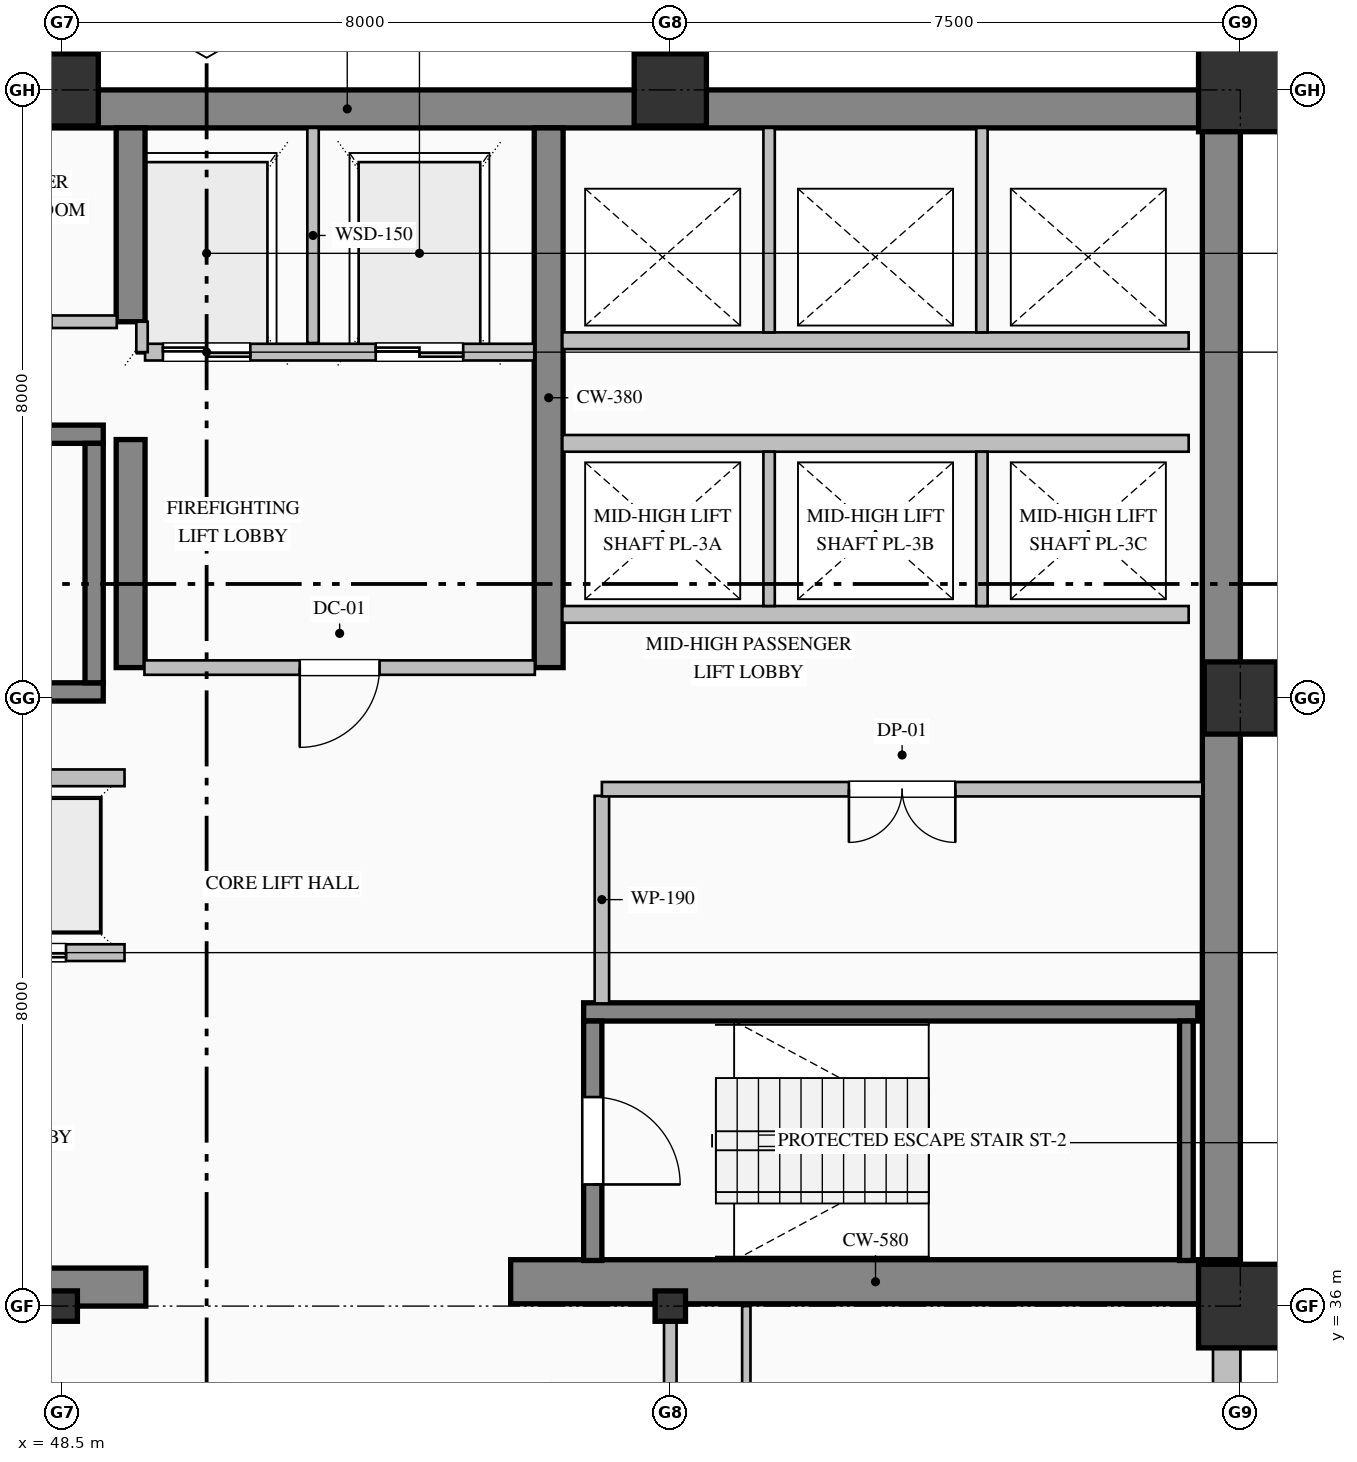
"""IFC4 building model, lengths in metres.
Left out: names, types, materials, properties, quantities, classifications, styles, units other than length and angle.
Written with IfcOpenShell. Run it as: python <this file> out.ifc"""

import sys

from ifc_helpers import new_model, si_unit, direction, frame, frame_2d, origin, origin_2d, place, context, subcontext, project, spatial, rectangle, hollow_rectangle, i_section, extrude, element, fill, save


model = new_model("IFC4")
c1 = context("Model", 3, precision=1e-05, world=origin(), true_north=direction((0.0, 1.0)))
c2 = subcontext(c1, "Body", "Model", "MODEL_VIEW")
j1 = project(units=[si_unit("LENGTHUNIT", "METRE"), si_unit("PLANEANGLEUNIT", "RADIAN")], contexts=[c1])
p1 = place(None, origin())
s1 = spatial("IfcSite", under=j1, at=p1, CompositionType="ELEMENT")
p2 = place(p1, origin())
s2 = spatial("IfcBuilding", under=s1, at=p2, CompositionType="ELEMENT")
p3 = place(p2, frame((0.0, 0.0, 155.0)))
s3 = spatial("IfcBuildingStorey", under=s2, at=p3, CompositionType="ELEMENT", Elevation=155.0)
p4 = place(p3, frame((40.5, 51.75, 0.0), z_axis=(0.0, 0.0, 1.0), x_axis=(1.0, 0.0, 0.0)))
e1 = element("IfcWall", 1, at=p4, inside=s3, PredefinedType="SHEAR", context=c2, shape_type="SweptSolid", body=[
    extrude(rectangle(XDim=23.5, YDim=0.5, at=frame_2d((11.75, 0.0))), origin(), (0.0, 0.0, 1.0), 3.765),
])
p5 = place(p3, frame((63.75, 36.32, 0.0), z_axis=(0.0, 0.0, 1.0), x_axis=(0.0, 1.0, 0.0)))
e2 = element("IfcWall", 2, at=p5, inside=s3, PredefinedType="SHEAR", context=c2, shape_type="SweptSolid", body=[
    extrude(rectangle(XDim=15.18, YDim=0.5, at=frame_2d((7.59, 0.0))), origin(), (0.0, 0.0, 1.0), 3.765),
])
p6 = place(p3, frame((40.5, 36.25, 0.0), z_axis=(0.0, 0.0, 1.0), x_axis=(1.0, 0.0, 0.0)))
e3 = element("IfcWall", 3, at=p6, inside=s3, PredefinedType="SHEAR", context=c2, shape_type="SweptSolid", body=[
    extrude(rectangle(XDim=9.1, YDim=0.5, at=frame_2d((4.55, 0.0))), origin(), (0.0, 0.0, 1.0), 3.765),
])
p7 = place(p3, frame((54.4, 36.32, 0.0), z_axis=(0.0, 0.0, 1.0), x_axis=(1.0, 0.0, 0.0)))
e4 = element("IfcWall", 4, at=p7, inside=s3, PredefinedType="SHEAR", context=c2, shape_type="SweptSolid", body=[
    extrude(rectangle(XDim=9.6, YDim=0.58, at=frame_2d((4.8, 0.0))), origin(), (0.0, 0.0, 1.0), 4.0),
])
p8 = place(p3, frame((49.4, 44.4, 0.0), z_axis=(0.0, 0.0, 1.0), x_axis=(0.0, 1.0, 0.0)))
e5 = element("IfcWall", 5, at=p8, inside=s3, PredefinedType="SHEAR", context=c2, shape_type="SweptSolid", body=[
    extrude(rectangle(XDim=3.0, YDim=0.38, at=frame_2d((1.5, 0.0))), origin(), (0.0, 0.0, 1.0), 3.765),
])
p9 = place(p3, frame((49.4, 48.95, 0.0), z_axis=(0.0, 0.0, 1.0), x_axis=(0.0, 1.0, 0.0)))
e6 = element("IfcWall", 6, at=p9, inside=s3, PredefinedType="SHEAR", context=c2, shape_type="SweptSolid", body=[
    extrude(rectangle(XDim=2.55, YDim=0.38, at=frame_2d((1.275, 0.0))), origin(), (0.0, 0.0, 1.0), 3.765),
])
p10 = place(p3, frame((54.9, 44.4, 0.0), z_axis=(0.0, 0.0, 1.0), x_axis=(0.0, 1.0, 0.0)))
e7 = element("IfcWall", 7, at=p10, inside=s3, PredefinedType="SHEAR", context=c2, shape_type="SweptSolid", body=[
    extrude(rectangle(XDim=7.1, YDim=0.38, at=frame_2d((3.55, 0.0))), origin(), (0.0, 0.0, 1.0), 3.765),
])
p11 = place(p3, frame((48.5, 36.0, 0.0), z_axis=(0.0, 0.0, 1.0), x_axis=(1.0, 0.0, 0.0)))
e8 = element("IfcColumn", 8, at=p11, inside=s3, PredefinedType="COLUMN", context=c2, shape_type="SweptSolid", body=[
    extrude(i_section(OverallWidth=0.4, OverallDepth=0.4, WebThickness=0.013, FlangeThickness=0.021, FilletRadius=0.022, at=origin_2d()), origin(), (0.0, 0.0, 1.0), 4.0),
])
p12 = place(p3, frame((48.5, 52.0, 0.0), z_axis=(0.0, 0.0, 1.0), x_axis=(1.0, 0.0, 0.0)))
e9 = element("IfcColumn", 9, at=p12, inside=s3, PredefinedType="COLUMN", context=c2, shape_type="SweptSolid", body=[
    extrude(hollow_rectangle(XDim=0.95, YDim=0.95, WallThickness=0.036, at=origin_2d()), origin(), (0.0, 0.0, 1.0), 4.0),
])
p13 = place(p3, frame((56.5, 36.0, 0.0), z_axis=(0.0, 0.0, 1.0), x_axis=(1.0, 0.0, 0.0)))
e10 = element("IfcColumn", 10, at=p13, inside=s3, PredefinedType="COLUMN", context=c2, shape_type="SweptSolid", body=[
    extrude(i_section(OverallWidth=0.4, OverallDepth=0.4, WebThickness=0.013, FlangeThickness=0.021, FilletRadius=0.022, at=origin_2d()), origin(), (0.0, 0.0, 1.0), 4.0),
])
p14 = place(p3, frame((56.5, 52.0, 0.0), z_axis=(0.0, 0.0, 1.0), x_axis=(1.0, 0.0, 0.0)))
e11 = element("IfcColumn", 11, at=p14, inside=s3, PredefinedType="COLUMN", context=c2, shape_type="SweptSolid", body=[
    extrude(hollow_rectangle(XDim=0.95, YDim=0.95, WallThickness=0.036, at=origin_2d()), origin(), (0.0, 0.0, 1.0), 4.0),
])
p15 = place(p3, frame((64.0, 36.0, 0.0), z_axis=(0.0, 0.0, 1.0), x_axis=(1.0, 0.0, 0.0)))
e12 = element("IfcColumn", 12, at=p15, inside=s3, PredefinedType="COLUMN", context=c2, shape_type="SweptSolid", body=[
    extrude(hollow_rectangle(XDim=1.1, YDim=1.1, WallThickness=0.04, at=origin_2d()), origin(), (0.0, 0.0, 1.0), 4.0),
])
p16 = place(p3, frame((64.0, 44.0, 0.0), z_axis=(0.0, 0.0, 1.0), x_axis=(1.0, 0.0, 0.0)))
e13 = element("IfcColumn", 13, at=p16, inside=s3, PredefinedType="COLUMN", context=c2, shape_type="SweptSolid", body=[
    extrude(hollow_rectangle(XDim=0.95, YDim=0.95, WallThickness=0.036, at=origin_2d()), origin(), (0.0, 0.0, 1.0), 4.0),
])
p17 = place(p3, frame((64.0, 52.0, 0.0), z_axis=(0.0, 0.0, 1.0), x_axis=(1.0, 0.0, 0.0)))
e14 = element("IfcColumn", 14, at=p17, inside=s3, PredefinedType="COLUMN", context=c2, shape_type="SweptSolid", body=[
    extrude(hollow_rectangle(XDim=1.1, YDim=1.1, WallThickness=0.04, at=origin_2d()), origin(), (0.0, 0.0, 1.0), 4.0),
])
p18 = place(p3, frame((63.82, 36.05, 0.0), z_axis=(0.0, 0.0, 1.0), x_axis=(0.0, -1.0, 0.0)))
e15 = element("IfcWall", 15, at=p18, inside=s3, PredefinedType="SOLIDWALL", context=c2, shape_type="SweptSolid", body=[
    extrude(rectangle(XDim=28.05, YDim=0.36, at=frame_2d((14.025, 0.0))), origin(), (0.0, 0.0, 1.0), 3.265),
])
p19 = place(p18, frame((2.775, 0.0, 0.85)))
e16 = element("IfcOpeningElement", 16, at=p19, cuts=e15, PredefinedType="OPENING", context=c2, shape_type="SweptSolid", body=[
    extrude(rectangle(XDim=1.65, YDim=1.95, at=frame_2d((0.825, 0.975))), frame((0.0, 0.19, 0.0), z_axis=(0.0, -1.0, 0.0), x_axis=(1.0, 0.0, 0.0)), (0.0, 0.0, 1.0), 0.38),
])
p20 = place(p18, frame((10.05, 0.0, 0.85)))
e17 = element("IfcOpeningElement", 17, at=p20, cuts=e15, PredefinedType="OPENING", context=c2, shape_type="SweptSolid", body=[
    extrude(rectangle(XDim=1.5, YDim=1.95, at=frame_2d((0.75, 0.975))), frame((0.0, 0.19, 0.0), z_axis=(0.0, -1.0, 0.0), x_axis=(1.0, 0.0, 0.0)), (0.0, 0.0, 1.0), 0.38),
])
p21 = place(p18, frame((13.575, 0.0, 0.85)))
e18 = element("IfcOpeningElement", 18, at=p21, cuts=e15, PredefinedType="OPENING", context=c2, shape_type="SweptSolid", body=[
    extrude(rectangle(XDim=1.65, YDim=1.95, at=frame_2d((0.825, 0.975))), frame((0.0, 0.19, 0.0), z_axis=(0.0, -1.0, 0.0), x_axis=(1.0, 0.0, 0.0)), (0.0, 0.0, 1.0), 0.38),
])
for number, where, z_axis, x_axis in (
    (19, (40.96, 47.47, 0.0), (0.0, 0.0, 1.0), (1.0, 0.0, 0.0)),
    (20, (49.04, 44.08, 0.0), (0.0, 0.0, 1.0), (-1.0, 0.0, 0.0)),
):
    element("IfcWall", number, at=place(p3, frame(where, z_axis=z_axis, x_axis=x_axis)), inside=s3, PredefinedType="SOLIDWALL", context=c2, shape_type="SweptSolid", body=[
        extrude(rectangle(XDim=8.08, YDim=0.24, at=frame_2d((4.04, 0.0))), origin(), (0.0, 0.0, 1.0), 4.0),
    ])
p22 = place(p3, frame((48.92, 44.2, 0.0), z_axis=(0.0, 0.0, 1.0), x_axis=(0.0, 1.0, 0.0)))
e21 = element("IfcWall", 21, at=p22, inside=s3, PredefinedType="SOLIDWALL", context=c2, shape_type="SweptSolid", body=[
    extrude(rectangle(XDim=3.15, YDim=0.24, at=frame_2d((1.575, 0.0))), origin(), (0.0, 0.0, 1.0), 4.0),
])
p23 = place(p3, frame((55.36, 39.87, 0.0), z_axis=(0.0, 0.0, 1.0), x_axis=(1.0, 0.0, 0.0)))
e22 = element("IfcWall", 22, at=p23, inside=s3, PredefinedType="SOLIDWALL", context=c2, shape_type="SweptSolid", body=[
    extrude(rectangle(XDim=8.08, YDim=0.24, at=frame_2d((4.04, 0.0))), origin(), (0.0, 0.0, 1.0), 4.0),
])
p24 = place(p3, frame((55.48, 39.75, 0.0), z_axis=(0.0, 0.0, 1.0), x_axis=(0.0, -1.0, 0.0)))
e23 = element("IfcWall", 23, at=p24, inside=s3, PredefinedType="SOLIDWALL", context=c2, shape_type="SweptSolid", body=[
    extrude(rectangle(XDim=3.15, YDim=0.24, at=frame_2d((1.575, 0.0))), origin(), (0.0, 0.0, 1.0), 4.0),
])
p25 = place(p24, frame((1.0, 0.0, 0.0)))
e24 = element("IfcOpeningElement", 24, at=p25, cuts=e23, PredefinedType="OPENING", context=c2, shape_type="SweptSolid", body=[
    extrude(rectangle(XDim=1.15, YDim=2.2, at=frame_2d((0.575, 1.1))), frame((0.0, 0.13, 0.0), z_axis=(0.0, -1.0, 0.0), x_axis=(1.0, 0.0, 0.0)), (0.0, 0.0, 1.0), 0.26),
])
p26 = place(p3, frame((63.29, 36.6, 0.0), z_axis=(0.0, 0.0, 1.0), x_axis=(0.0, 1.0, 0.0)))
e25 = element("IfcWall", 25, at=p26, inside=s3, PredefinedType="SOLIDWALL", context=c2, shape_type="SweptSolid", body=[
    extrude(rectangle(XDim=3.15, YDim=0.18, at=frame_2d((1.575, 0.0))), origin(), (0.0, 0.0, 1.0), 4.0),
])
p27 = place(p3, frame((54.71, 48.55, 0.0), z_axis=(0.0, 0.0, 1.0), x_axis=(-1.0, 0.0, 0.0)))
e26 = element("IfcWall", 26, at=p27, inside=s3, PredefinedType="PARTITIONING", context=c2, shape_type="SweptSolid", body=[
    extrude(rectangle(XDim=5.12, YDim=0.22, at=frame_2d((2.56, 0.0))), origin(), (0.0, 0.0, 1.0), 3.765),
])
p28 = place(p27, frame((3.735, 0.0, 0.0)))
e27 = element("IfcOpeningElement", 27, at=p28, cuts=e26, PredefinedType="OPENING", context=c2, shape_type="SweptSolid", body=[
    extrude(rectangle(XDim=1.15, YDim=2.2, at=frame_2d((0.575, 1.1))), frame((0.0, 0.12, 0.0), z_axis=(0.0, -1.0, 0.0), x_axis=(1.0, 0.0, 0.0)), (0.0, 0.0, 1.0), 0.24),
])
p29 = place(p27, frame((0.935, 0.0, 0.0)))
e28 = element("IfcOpeningElement", 28, at=p29, cuts=e26, PredefinedType="OPENING", context=c2, shape_type="SweptSolid", body=[
    extrude(rectangle(XDim=1.15, YDim=2.2, at=frame_2d((0.575, 1.1))), frame((0.0, 0.12, 0.0), z_axis=(0.0, -1.0, 0.0), x_axis=(1.0, 0.0, 0.0)), (0.0, 0.0, 1.0), 0.24),
])
p30 = place(p3, frame((51.8, 48.67, 0.0), z_axis=(0.0, 0.0, 1.0), x_axis=(0.0, 1.0, 0.0)))
e29 = element("IfcWall", 29, at=p30, inside=s3, PredefinedType="PARTITIONING", context=c2, shape_type="SweptSolid", body=[
    extrude(rectangle(XDim=2.83, YDim=0.15, at=frame_2d((1.415, 0.0))), origin(), (0.0, 0.0, 1.0), 3.765),
])
p31 = place(p3, frame((49.55, 48.55, 0.0), z_axis=(0.0, 0.0, 1.0), x_axis=(0.0, 1.0, 0.0)))
e30 = element("IfcWall", 30, at=p31, inside=s3, PredefinedType="PARTITIONING", context=c2, shape_type="SweptSolid", body=[
    extrude(rectangle(XDim=0.4, YDim=0.15, at=frame_2d((0.2, 0.0))), origin(), (0.0, 0.0, 1.0), 3.765),
])
p32 = place(p3, frame((49.32, 40.65, 0.0), z_axis=(0.0, 0.0, 1.0), x_axis=(-1.0, 0.0, 0.0)))
e31 = element("IfcWall", 31, at=p32, inside=s3, PredefinedType="PARTITIONING", context=c2, shape_type="SweptSolid", body=[
    extrude(rectangle(XDim=8.24, YDim=0.22, at=frame_2d((4.12, 0.0))), origin(), (0.0, 0.0, 1.0), 3.765),
])
p33 = place(p32, frame((6.37, 0.0, 0.0)))
e32 = element("IfcOpeningElement", 32, at=p33, cuts=e31, PredefinedType="OPENING", context=c2, shape_type="SweptSolid", body=[
    extrude(rectangle(XDim=1.1, YDim=2.2, at=frame_2d((0.55, 1.1))), frame((0.0, 0.12, 0.0), z_axis=(0.0, -1.0, 0.0), x_axis=(1.0, 0.0, 0.0)), (0.0, 0.0, 1.0), 0.24),
])
p34 = place(p32, frame((3.57, 0.0, 0.0)))
e33 = element("IfcOpeningElement", 33, at=p34, cuts=e31, PredefinedType="OPENING", context=c2, shape_type="SweptSolid", body=[
    extrude(rectangle(XDim=1.1, YDim=2.2, at=frame_2d((0.55, 1.1))), frame((0.0, 0.12, 0.0), z_axis=(0.0, -1.0, 0.0), x_axis=(1.0, 0.0, 0.0)), (0.0, 0.0, 1.0), 0.24),
])
p35 = place(p32, frame((0.77, 0.0, 0.0)))
e34 = element("IfcOpeningElement", 34, at=p35, cuts=e31, PredefinedType="OPENING", context=c2, shape_type="SweptSolid", body=[
    extrude(rectangle(XDim=1.1, YDim=2.2, at=frame_2d((0.55, 1.1))), frame((0.0, 0.12, 0.0), z_axis=(0.0, -1.0, 0.0), x_axis=(1.0, 0.0, 0.0)), (0.0, 0.0, 1.0), 0.24),
])
for number, where, z_axis, x_axis in (
    (35, (41.08, 42.95, 0.0), (0.0, 0.0, 1.0), (1.0, 0.0, 0.0)),
    (36, (63.32, 45.1, 0.0), (0.0, 0.0, 1.0), (-1.0, 0.0, 0.0)),
    (37, (55.08, 47.35, 0.0), (0.0, 0.0, 1.0), (1.0, 0.0, 0.0)),
):
    element("IfcWall", number, at=place(p3, frame(where, z_axis=z_axis, x_axis=x_axis)), inside=s3, PredefinedType="PARTITIONING", context=c2, shape_type="SweptSolid", body=[
        extrude(rectangle(XDim=8.24, YDim=0.22, at=frame_2d((4.12, 0.0))), origin(), (0.0, 0.0, 1.0), 3.765),
    ])
for number, where, z_axis, x_axis in (
    (38, (57.8, 45.21, 0.0), (0.0, 0.0, 1.0), (0.0, 1.0, 0.0)),
    (39, (60.6, 45.21, 0.0), (0.0, 0.0, 1.0), (0.0, 1.0, 0.0)),
):
    element("IfcWall", number, at=place(p3, frame(where, z_axis=z_axis, x_axis=x_axis)), inside=s3, PredefinedType="PARTITIONING", context=c2, shape_type="SweptSolid", body=[
        extrude(rectangle(XDim=2.03, YDim=0.15, at=frame_2d((1.015, 0.0))), origin(), (0.0, 0.0, 1.0), 3.765),
    ])
p36 = place(p3, frame((63.32, 48.7, 0.0), z_axis=(0.0, 0.0, 1.0), x_axis=(-1.0, 0.0, 0.0)))
e40 = element("IfcWall", 40, at=p36, inside=s3, PredefinedType="PARTITIONING", context=c2, shape_type="SweptSolid", body=[
    extrude(rectangle(XDim=8.24, YDim=0.22, at=frame_2d((4.12, 0.0))), origin(), (0.0, 0.0, 1.0), 3.765),
])
for number, where, z_axis, x_axis in (
    (41, (57.8, 48.81, 0.0), (0.0, 0.0, 1.0), (0.0, 1.0, 0.0)),
    (42, (60.6, 48.81, 0.0), (0.0, 0.0, 1.0), (0.0, 1.0, 0.0)),
):
    element("IfcWall", number, at=place(p3, frame(where, z_axis=z_axis, x_axis=x_axis)), inside=s3, PredefinedType="PARTITIONING", context=c2, shape_type="SweptSolid", body=[
        extrude(rectangle(XDim=2.69, YDim=0.15, at=frame_2d((1.345, 0.0))), origin(), (0.0, 0.0, 1.0), 3.765),
    ])
p37 = place(p3, frame((46.6, 48.95, 0.0), z_axis=(0.0, 0.0, 1.0), x_axis=(1.0, 0.0, 0.0)))
e43 = element("IfcWall", 43, at=p37, inside=s3, PredefinedType="PARTITIONING", context=c2, shape_type="SweptSolid", body=[
    extrude(rectangle(XDim=2.618, YDim=0.165, at=frame_2d((1.309, 0.0))), origin(), (0.0, 0.0, 1.0), 3.765),
])
p38 = place(p37, frame((0.859, 0.0, 0.0)))
e44 = element("IfcOpeningElement", 44, at=p38, cuts=e43, PredefinedType="OPENING", context=c2, shape_type="SweptSolid", body=[
    extrude(rectangle(XDim=0.9, YDim=2.15, at=frame_2d((0.45, 1.075))), frame((0.0, 0.093, 0.0), z_axis=(0.0, -1.0, 0.0), x_axis=(1.0, 0.0, 0.0)), (0.0, 0.0, 1.0), 0.185),
])
p39 = place(p3, frame((54.718, 44.4, 0.0), z_axis=(0.0, 0.0, 1.0), x_axis=(-1.0, 0.0, 0.0)))
e45 = element("IfcWall", 45, at=p39, inside=s3, PredefinedType="PARTITIONING", context=c2, shape_type="SweptSolid", body=[
    extrude(rectangle(XDim=5.136, YDim=0.19, at=frame_2d((2.568, 0.0))), origin(), (0.0, 0.0, 1.0), 3.765),
])
p40 = place(p39, frame((2.043, 0.0, 0.0)))
e46 = element("IfcOpeningElement", 46, at=p40, cuts=e45, PredefinedType="OPENING", context=c2, shape_type="SweptSolid", body=[
    extrude(rectangle(XDim=1.05, YDim=2.15, at=frame_2d((0.525, 1.075))), frame((0.0, 0.105, 0.0), z_axis=(0.0, -1.0, 0.0), x_axis=(1.0, 0.0, 0.0)), (0.0, 0.0, 1.0), 0.21),
])
p41 = place(p3, frame((55.6, 42.713, 0.0), z_axis=(0.0, 0.0, 1.0), x_axis=(0.0, -1.0, 0.0)))
e47 = element("IfcWall", 47, at=p41, inside=s3, PredefinedType="PARTITIONING", context=c2, shape_type="SweptSolid", body=[
    extrude(rectangle(XDim=2.731, YDim=0.19, at=frame_2d((1.365, 0.0))), origin(), (0.0, 0.0, 1.0), 3.765),
])
p42 = place(p3, frame((63.5, 42.8, 0.0), z_axis=(0.0, 0.0, 1.0), x_axis=(-1.0, 0.0, 0.0)))
e48 = element("IfcWall", 48, at=p42, inside=s3, PredefinedType="PARTITIONING", context=c2, shape_type="SweptSolid", body=[
    extrude(rectangle(XDim=7.9, YDim=0.19, at=frame_2d((3.95, 0.0))), origin(), (0.0, 0.0, 1.0), 3.765),
])
p43 = place(p42, frame((3.25, 0.0, 0.0)))
e49 = element("IfcOpeningElement", 49, at=p43, cuts=e48, PredefinedType="OPENING", context=c2, shape_type="SweptSolid", body=[
    extrude(rectangle(XDim=1.4, YDim=2.25, at=frame_2d((0.7, 1.125))), frame((0.0, 0.105, 0.0), z_axis=(0.0, -1.0, 0.0), x_axis=(1.0, 0.0, 0.0)), (0.0, 0.0, 1.0), 0.21),
])
p44 = place(p3, frame((56.5, 36.0, 0.0), z_axis=(0.0, 0.0, 1.0), x_axis=(0.0, -1.0, 0.0)))
e50 = element("IfcWall", 50, at=p44, inside=s3, PredefinedType="PARTITIONING", context=c2, shape_type="SweptSolid", body=[
    extrude(rectangle(XDim=2.325, YDim=0.165, at=frame_2d((1.163, 0.0))), origin(), (0.0, 0.0, 1.0), 3.157),
])
p45 = place(p3, frame((57.5, 36.0, 0.0), z_axis=(0.0, 0.0, 1.0), x_axis=(0.0, -1.0, 0.0)))
e51 = element("IfcWall", 51, at=p45, inside=s3, PredefinedType="MOVABLE", context=c2, shape_type="SweptSolid", body=[
    extrude(rectangle(XDim=21.226, YDim=0.11, at=frame_2d((10.613, 0.0))), origin(), (0.0, 0.0, 1.0), 3.765),
])
p46 = place(p25, origin())
e52 = element("IfcDoor", 52, at=p46, inside=s3, OperationType="SINGLE_SWING_RIGHT", PredefinedType="DOOR", context=c2, shape_type="SweptSolid", body=[
    extrude(rectangle(XDim=1.15, YDim=2.2, at=frame_2d((0.575, 1.1))), frame((0.0, 0.025, 0.0), z_axis=(0.0, -1.0, 0.0), x_axis=(1.0, 0.0, 0.0)), (0.0, 0.0, 1.0), 0.05),
])
fill(e24, e52)
p47 = place(p28, origin())
e53 = element("IfcDoor", 53, at=p47, inside=s3, OperationType="DOUBLE_DOOR_SLIDING", PredefinedType="DOOR", context=c2, shape_type="SweptSolid", body=[
    extrude(rectangle(XDim=1.15, YDim=2.2, at=frame_2d((0.575, 1.1))), frame((0.0, 0.025, 0.0), z_axis=(0.0, -1.0, 0.0), x_axis=(1.0, 0.0, 0.0)), (0.0, 0.0, 1.0), 0.05),
])
fill(e27, e53)
p48 = place(p29, origin())
e54 = element("IfcDoor", 54, at=p48, inside=s3, OperationType="DOUBLE_DOOR_SLIDING", PredefinedType="DOOR", context=c2, shape_type="SweptSolid", body=[
    extrude(rectangle(XDim=1.15, YDim=2.2, at=frame_2d((0.575, 1.1))), frame((0.0, 0.025, 0.0), z_axis=(0.0, -1.0, 0.0), x_axis=(1.0, 0.0, 0.0)), (0.0, 0.0, 1.0), 0.05),
])
fill(e28, e54)
p49 = place(p35, origin())
e55 = element("IfcDoor", 55, at=p49, inside=s3, OperationType="DOUBLE_DOOR_SLIDING", PredefinedType="DOOR", context=c2, shape_type="SweptSolid", body=[
    extrude(rectangle(XDim=1.1, YDim=2.2, at=frame_2d((0.55, 1.1))), frame((0.0, 0.025, 0.0), z_axis=(0.0, -1.0, 0.0), x_axis=(1.0, 0.0, 0.0)), (0.0, 0.0, 1.0), 0.05),
])
fill(e34, e55)
p50 = place(p40, origin())
e56 = element("IfcDoor", 56, at=p50, inside=s3, OperationType="SINGLE_SWING_RIGHT", PredefinedType="DOOR", context=c2, shape_type="SweptSolid", body=[
    extrude(rectangle(XDim=1.05, YDim=2.15, at=frame_2d((0.525, 1.075))), frame((0.0, 0.025, 0.0), z_axis=(0.0, -1.0, 0.0), x_axis=(1.0, 0.0, 0.0)), (0.0, 0.0, 1.0), 0.05),
])
fill(e46, e56)
p51 = place(p43, origin())
e57 = element("IfcDoor", 57, at=p51, inside=s3, OperationType="DOUBLE_DOOR_SINGLE_SWING", PredefinedType="DOOR", context=c2, shape_type="SweptSolid", body=[
    extrude(rectangle(XDim=1.4, YDim=2.25, at=frame_2d((0.7, 1.125))), frame((0.0, 0.025, 0.0), z_axis=(0.0, -1.0, 0.0), x_axis=(1.0, 0.0, 0.0)), (0.0, 0.0, 1.0), 0.05),
])
fill(e49, e57)
save(model, sys.argv[1])
